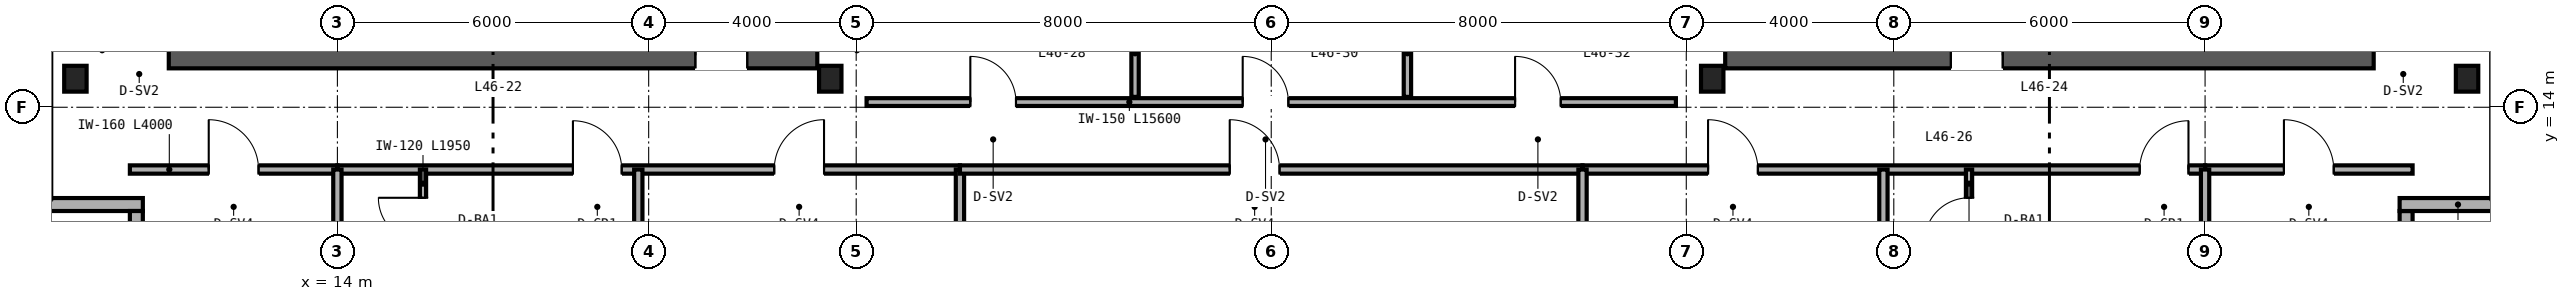
"""IFC4 building model, lengths in metres.
Left out: names, types, materials, properties, quantities, classifications, styles, units other than length and angle.
Written with IfcOpenShell. Run it as: python <this file> out.ifc"""

import sys

from ifc_helpers import new_model, si_unit, direction, frame, frame_2d, origin, origin_2d, place, context, subcontext, project, spatial, rectangle, i_section, extrude, source, transform, mapped, element, fill, save


model = new_model("IFC4")
c1 = context("Model", 3, precision=1e-05, world=origin(), true_north=direction((0.0, 1.0)))
c2 = subcontext(c1, "Body", "Model", "MODEL_VIEW")
j1 = project(units=[si_unit("LENGTHUNIT", "METRE"), si_unit("PLANEANGLEUNIT", "RADIAN")], contexts=[c1])
p1 = place(None, origin())
s1 = spatial("IfcSite", under=j1, at=p1, CompositionType="ELEMENT")
p2 = place(p1, origin())
s2 = spatial("IfcBuilding", under=s1, at=p2, CompositionType="ELEMENT")
p3 = place(p2, frame((0.0, 0.0, 184.8)))
s3 = spatial("IfcBuildingStorey", under=s2, at=p3, CompositionType="ELEMENT", Elevation=184.8)
p4 = place(p3, frame((10.75, 15.0, 0.0), z_axis=(0.0, 0.0, 1.0), x_axis=(1.0, 0.0, 0.0)))
e1 = element("IfcWall", 1, at=p4, inside=s3, PredefinedType="SHEAR", context=c2, shape_type="SweptSolid", body=[
    extrude(rectangle(XDim=12.5, YDim=0.5, at=frame_2d((6.25, 0.0))), origin(), (0.0, 0.0, 1.0), 3.37),
])
p5 = place(p4, frame((10.15, 0.0, 0.0)))
e2 = element("IfcOpeningElement", 2, at=p5, cuts=e1, PredefinedType="OPENING", context=c2, shape_type="SweptSolid", body=[
    extrude(rectangle(XDim=1.0, YDim=2.15, at=frame_2d((0.5, 1.075))), frame((0.0, 0.26, 0.0), z_axis=(0.0, -1.0, 0.0), x_axis=(1.0, 0.0, 0.0)), (0.0, 0.0, 1.0), 0.52),
])
p6 = place(p3, frame((40.75, 15.0, 0.0), z_axis=(0.0, 0.0, 1.0), x_axis=(1.0, 0.0, 0.0)))
e3 = element("IfcWall", 3, at=p6, inside=s3, PredefinedType="SHEAR", context=c2, shape_type="SweptSolid", body=[
    extrude(rectangle(XDim=12.5, YDim=0.5, at=frame_2d((6.25, 0.0))), origin(), (0.0, 0.0, 1.0), 3.37),
])
p7 = place(p6, frame((4.35, 0.0, 0.0)))
e4 = element("IfcOpeningElement", 4, at=p7, cuts=e3, PredefinedType="OPENING", context=c2, shape_type="SweptSolid", body=[
    extrude(rectangle(XDim=1.0, YDim=2.15, at=frame_2d((0.5, 1.075))), frame((0.0, 0.26, 0.0), z_axis=(0.0, -1.0, 0.0), x_axis=(1.0, 0.0, 0.0)), (0.0, 0.0, 1.0), 0.52),
])
m1 = source(origin(), c2, "Body", "SweptSolid", [
    extrude(i_section(OverallWidth=0.432, OverallDepth=0.498, WebThickness=0.056, FlangeThickness=0.089, FilletRadius=0.025, at=origin_2d()), origin(), (0.0, 0.0, 1.0), 3.37),
])
for number, where, z_axis, x_axis in (
    (5, (8.95, 14.55, 0.0), (0.0, 0.0, 1.0), (1.0, 0.0, 0.0)),
    (6, (23.5, 14.55, 0.0), (0.0, 0.0, 1.0), (1.0, 0.0, 0.0)),
    (7, (40.5, 14.55, 0.0), (0.0, 0.0, 1.0), (1.0, 0.0, 0.0)),
    (8, (55.05, 14.55, 0.0), (0.0, 0.0, 1.0), (1.0, 0.0, 0.0)),
):
    element("IfcColumn", number, at=place(p3, frame(where, z_axis=z_axis, x_axis=x_axis)), inside=s3, PredefinedType="COLUMN", context=c2, shape_type="MappedRepresentation", body=[
        mapped(m1, transform((0.0, 0.0, 0.0), scale=1.0)),
    ])
p8 = place(p3, frame((53.875, 10.0, 0.0), z_axis=(0.0, 0.0, 1.0), x_axis=(0.0, 1.0, 0.0)))
e9 = element("IfcWall", 9, at=p8, inside=s3, PredefinedType="SOLIDWALL", context=c2, shape_type="SweptSolid", body=[
    extrude(rectangle(XDim=2.0, YDim=0.25, at=frame_2d((1.0, 0.0))), origin(), (0.0, 0.0, 1.0), 3.37),
])
for number, where, z_axis, x_axis in (
    (10, (53.75, 12.125, 0.0), (0.0, 0.0, 1.0), (1.0, 0.0, 0.0)),
    (11, (8.0, 12.125, 0.0), (0.0, 0.0, 1.0), (1.0, 0.0, 0.0)),
):
    element("IfcWall", number, at=place(p3, frame(where, z_axis=z_axis, x_axis=x_axis)), inside=s3, PredefinedType="SOLIDWALL", context=c2, shape_type="SweptSolid", body=[
        extrude(rectangle(XDim=2.25, YDim=0.25, at=frame_2d((1.125, 0.0))), origin(), (0.0, 0.0, 1.0), 3.37),
    ])
p9 = place(p3, frame((10.125, 12.0, 0.0), z_axis=(0.0, 0.0, 1.0), x_axis=(0.0, -1.0, 0.0)))
e12 = element("IfcWall", 12, at=p9, inside=s3, PredefinedType="SOLIDWALL", context=c2, shape_type="SweptSolid", body=[
    extrude(rectangle(XDim=2.0, YDim=0.25, at=frame_2d((1.0, 0.0))), origin(), (0.0, 0.0, 1.0), 3.37),
])
p10 = place(p3, frame((24.2, 14.1, 0.0), z_axis=(0.0, 0.0, 1.0), x_axis=(1.0, 0.0, 0.0)))
e13 = element("IfcWall", 13, at=p10, inside=s3, PredefinedType="PARTITIONING", context=c2, shape_type="SweptSolid", body=[
    extrude(rectangle(XDim=15.6, YDim=0.15, at=frame_2d((7.8, 0.0))), origin(), (0.0, 0.0, 1.0), 3.37),
])
p11 = place(p10, frame((2.0, 0.0, 0.0)))
e14 = element("IfcOpeningElement", 14, at=p11, cuts=e13, PredefinedType="OPENING", context=c2, shape_type="SweptSolid", body=[
    extrude(rectangle(XDim=0.88, YDim=2.15, at=frame_2d((0.44, 1.075))), frame((0.0, 0.085, 0.0), z_axis=(0.0, -1.0, 0.0), x_axis=(1.0, 0.0, 0.0)), (0.0, 0.0, 1.0), 0.17),
])
p12 = place(p10, frame((7.25, 0.0, 0.0)))
e15 = element("IfcOpeningElement", 15, at=p12, cuts=e13, PredefinedType="OPENING", context=c2, shape_type="SweptSolid", body=[
    extrude(rectangle(XDim=0.88, YDim=2.15, at=frame_2d((0.44, 1.075))), frame((0.0, 0.085, 0.0), z_axis=(0.0, -1.0, 0.0), x_axis=(1.0, 0.0, 0.0)), (0.0, 0.0, 1.0), 0.17),
])
p13 = place(p10, frame((12.5, 0.0, 0.0)))
e16 = element("IfcOpeningElement", 16, at=p13, cuts=e13, PredefinedType="OPENING", context=c2, shape_type="SweptSolid", body=[
    extrude(rectangle(XDim=0.88, YDim=2.15, at=frame_2d((0.44, 1.075))), frame((0.0, 0.085, 0.0), z_axis=(0.0, -1.0, 0.0), x_axis=(1.0, 0.0, 0.0)), (0.0, 0.0, 1.0), 0.17),
])
for number, where, z_axis, x_axis in (
    (17, (29.375, 14.2, 0.0), (0.0, 0.0, 1.0), (0.0, 1.0, 0.0)),
    (18, (34.625, 14.2, 0.0), (0.0, 0.0, 1.0), (0.0, 1.0, 0.0)),
):
    element("IfcWall", number, at=place(p3, frame(where, z_axis=z_axis, x_axis=x_axis)), inside=s3, PredefinedType="PARTITIONING", context=c2, shape_type="SweptSolid", body=[
        extrude(rectangle(XDim=1.68, YDim=0.142, at=frame_2d((0.84, 0.0))), origin(), (0.0, 0.0, 1.0), 3.37),
    ])
p14 = place(p3, frame((10.0, 12.8, 0.0), z_axis=(0.0, 0.0, 1.0), x_axis=(1.0, 0.0, 0.0)))
e19 = element("IfcWall", 19, at=p14, inside=s3, PredefinedType="PARTITIONING", context=c2, shape_type="SweptSolid", body=[
    extrude(rectangle(XDim=4.0, YDim=0.16, at=frame_2d((2.0, 0.0))), origin(), (0.0, 0.0, 1.0), 3.37),
])
p15 = place(p14, frame((1.52, 0.0, 0.0)))
e20 = element("IfcOpeningElement", 20, at=p15, cuts=e19, PredefinedType="OPENING", context=c2, shape_type="SweptSolid", body=[
    extrude(rectangle(XDim=0.96, YDim=2.15, at=frame_2d((0.48, 1.075))), frame((0.0, 0.09, 0.0), z_axis=(0.0, -1.0, 0.0), x_axis=(1.0, 0.0, 0.0)), (0.0, 0.0, 1.0), 0.18),
])
p16 = place(p3, frame((50.0, 12.8, 0.0), z_axis=(0.0, 0.0, 1.0), x_axis=(1.0, 0.0, 0.0)))
e21 = element("IfcWall", 21, at=p16, inside=s3, PredefinedType="PARTITIONING", context=c2, shape_type="SweptSolid", body=[
    extrude(rectangle(XDim=4.0, YDim=0.16, at=frame_2d((2.0, 0.0))), origin(), (0.0, 0.0, 1.0), 3.37),
])
p17 = place(p16, frame((1.52, 0.0, 0.0)))
e22 = element("IfcOpeningElement", 22, at=p17, cuts=e21, PredefinedType="OPENING", context=c2, shape_type="SweptSolid", body=[
    extrude(rectangle(XDim=0.96, YDim=2.15, at=frame_2d((0.48, 1.075))), frame((0.0, 0.09, 0.0), z_axis=(0.0, -1.0, 0.0), x_axis=(1.0, 0.0, 0.0)), (0.0, 0.0, 1.0), 0.18),
])
p18 = place(p3, frame((14.0, 12.8, 0.0), z_axis=(0.0, 0.0, 1.0), x_axis=(1.0, 0.0, 0.0)))
e23 = element("IfcWall", 23, at=p18, inside=s3, PredefinedType="PARTITIONING", context=c2, shape_type="SweptSolid", body=[
    extrude(rectangle(XDim=12.0, YDim=0.16, at=frame_2d((6.0, 0.0))), origin(), (0.0, 0.0, 1.0), 2.913),
])
p19 = place(p18, frame((4.54, 0.0, 0.0)))
e24 = element("IfcOpeningElement", 24, at=p19, cuts=e23, PredefinedType="OPENING", context=c2, shape_type="SweptSolid", body=[
    extrude(rectangle(XDim=0.94, YDim=2.15, at=frame_2d((0.47, 1.075))), frame((0.0, 0.09, 0.0), z_axis=(0.0, -1.0, 0.0), x_axis=(1.0, 0.0, 0.0)), (0.0, 0.0, 1.0), 0.18),
])
p20 = place(p18, frame((8.42, 0.0, 0.0)))
e25 = element("IfcOpeningElement", 25, at=p20, cuts=e23, PredefinedType="OPENING", context=c2, shape_type="SweptSolid", body=[
    extrude(rectangle(XDim=0.96, YDim=2.15, at=frame_2d((0.48, 1.075))), frame((0.0, 0.09, 0.0), z_axis=(0.0, -1.0, 0.0), x_axis=(1.0, 0.0, 0.0)), (0.0, 0.0, 1.0), 0.18),
])
p21 = place(p3, frame((14.0, 6.36, 0.0), z_axis=(0.0, 0.0, 1.0), x_axis=(0.0, 1.0, 0.0)))
e26 = element("IfcWall", 26, at=p21, inside=s3, PredefinedType="PARTITIONING", context=c2, shape_type="SweptSolid", body=[
    extrude(rectangle(XDim=6.44, YDim=0.16, at=frame_2d((3.22, 0.0))), origin(), (0.0, 0.0, 1.0), 2.677),
])
p22 = place(p3, frame((26.0, 6.36, 0.0), z_axis=(0.0, 0.0, 1.0), x_axis=(0.0, 1.0, 0.0)))
e27 = element("IfcWall", 27, at=p22, inside=s3, PredefinedType="PARTITIONING", context=c2, shape_type="SweptSolid", body=[
    extrude(rectangle(XDim=6.44, YDim=0.16, at=frame_2d((3.22, 0.0))), origin(), (0.0, 0.0, 1.0), 2.443),
])
p23 = place(p3, frame((19.8, 6.36, 0.0), z_axis=(0.0, 0.0, 1.0), x_axis=(0.0, 1.0, 0.0)))
e28 = element("IfcWall", 28, at=p23, inside=s3, PredefinedType="PARTITIONING", context=c2, shape_type="SweptSolid", body=[
    extrude(rectangle(XDim=6.44, YDim=0.16, at=frame_2d((3.22, 0.0))), origin(), (0.0, 0.0, 1.0), 2.677),
])
p24 = place(p3, frame((15.65, 10.85, 0.0), z_axis=(0.0, 0.0, 1.0), x_axis=(0.0, 1.0, 0.0)))
e29 = element("IfcWall", 29, at=p24, inside=s3, PredefinedType="PARTITIONING", context=c2, shape_type="SweptSolid", body=[
    extrude(rectangle(XDim=1.95, YDim=0.12, at=frame_2d((0.975, 0.0))), origin(), (0.0, 0.0, 1.0), 3.37),
])
p25 = place(p24, frame((0.545, 0.0, 0.0)))
e30 = element("IfcOpeningElement", 30, at=p25, cuts=e29, PredefinedType="OPENING", context=c2, shape_type="SweptSolid", body=[
    extrude(rectangle(XDim=0.86, YDim=2.1, at=frame_2d((0.43, 1.05))), frame((0.0, 0.07, 0.0), z_axis=(0.0, -1.0, 0.0), x_axis=(1.0, 0.0, 0.0)), (0.0, 0.0, 1.0), 0.14),
])
p26 = place(p3, frame((26.0, 12.8, 0.0), z_axis=(0.0, 0.0, 1.0), x_axis=(1.0, 0.0, 0.0)))
e31 = element("IfcWall", 31, at=p26, inside=s3, PredefinedType="PARTITIONING", context=c2, shape_type="SweptSolid", body=[
    extrude(rectangle(XDim=12.0, YDim=0.16, at=frame_2d((6.0, 0.0))), origin(), (0.0, 0.0, 1.0), 3.37),
])
p27 = place(p26, frame((5.2, 0.0, 0.0)))
e32 = element("IfcOpeningElement", 32, at=p27, cuts=e31, PredefinedType="OPENING", context=c2, shape_type="SweptSolid", body=[
    extrude(rectangle(XDim=0.96, YDim=2.15, at=frame_2d((0.48, 1.075))), frame((0.0, 0.09, 0.0), z_axis=(0.0, -1.0, 0.0), x_axis=(1.0, 0.0, 0.0)), (0.0, 0.0, 1.0), 0.18),
])
p28 = place(p3, frame((38.0, 12.8, 0.0), z_axis=(0.0, 0.0, 1.0), x_axis=(1.0, 0.0, 0.0)))
e33 = element("IfcWall", 33, at=p28, inside=s3, PredefinedType="PARTITIONING", context=c2, shape_type="SweptSolid", body=[
    extrude(rectangle(XDim=12.0, YDim=0.16, at=frame_2d((6.0, 0.0))), origin(), (0.0, 0.0, 1.0), 2.913),
])
p29 = place(p28, frame((2.42, 0.0, 0.0)))
e34 = element("IfcOpeningElement", 34, at=p29, cuts=e33, PredefinedType="OPENING", context=c2, shape_type="SweptSolid", body=[
    extrude(rectangle(XDim=0.96, YDim=2.15, at=frame_2d((0.48, 1.075))), frame((0.0, 0.09, 0.0), z_axis=(0.0, -1.0, 0.0), x_axis=(1.0, 0.0, 0.0)), (0.0, 0.0, 1.0), 0.18),
])
p30 = place(p28, frame((10.74, 0.0, 0.0)))
e35 = element("IfcOpeningElement", 35, at=p30, cuts=e33, PredefinedType="OPENING", context=c2, shape_type="SweptSolid", body=[
    extrude(rectangle(XDim=0.94, YDim=2.15, at=frame_2d((0.47, 1.075))), frame((0.0, 0.09, 0.0), z_axis=(0.0, -1.0, 0.0), x_axis=(1.0, 0.0, 0.0)), (0.0, 0.0, 1.0), 0.18),
])
p31 = place(p3, frame((38.0, 6.36, 0.0), z_axis=(0.0, 0.0, 1.0), x_axis=(0.0, 1.0, 0.0)))
e36 = element("IfcWall", 36, at=p31, inside=s3, PredefinedType="PARTITIONING", context=c2, shape_type="SweptSolid", body=[
    extrude(rectangle(XDim=6.44, YDim=0.16, at=frame_2d((3.22, 0.0))), origin(), (0.0, 0.0, 1.0), 2.443),
])
for number, where, z_axis, x_axis in (
    (37, (50.0, 6.36, 0.0), (0.0, 0.0, 1.0), (0.0, 1.0, 0.0)),
    (38, (43.8, 6.36, 0.0), (0.0, 0.0, 1.0), (0.0, 1.0, 0.0)),
):
    element("IfcWall", number, at=place(p3, frame(where, z_axis=z_axis, x_axis=x_axis)), inside=s3, PredefinedType="PARTITIONING", context=c2, shape_type="SweptSolid", body=[
        extrude(rectangle(XDim=6.44, YDim=0.16, at=frame_2d((3.22, 0.0))), origin(), (0.0, 0.0, 1.0), 2.677),
    ])
p32 = place(p3, frame((45.45, 10.85, 0.0), z_axis=(0.0, 0.0, 1.0), x_axis=(0.0, 1.0, 0.0)))
e39 = element("IfcWall", 39, at=p32, inside=s3, PredefinedType="PARTITIONING", context=c2, shape_type="SweptSolid", body=[
    extrude(rectangle(XDim=1.95, YDim=0.12, at=frame_2d((0.975, 0.0))), origin(), (0.0, 0.0, 1.0), 3.37),
])
p33 = place(p32, frame((0.545, 0.0, 0.0)))
e40 = element("IfcOpeningElement", 40, at=p33, cuts=e39, PredefinedType="OPENING", context=c2, shape_type="SweptSolid", body=[
    extrude(rectangle(XDim=0.86, YDim=2.1, at=frame_2d((0.43, 1.05))), frame((0.0, 0.07, 0.0), z_axis=(0.0, -1.0, 0.0), x_axis=(1.0, 0.0, 0.0)), (0.0, 0.0, 1.0), 0.14),
])
m2 = source(origin(), c2, "Body", "SweptSolid", [
    extrude(rectangle(XDim=1.0, YDim=2.15, at=frame_2d((0.5, 1.075))), frame((0.0, 0.025, 0.0), z_axis=(0.0, -1.0, 0.0), x_axis=(1.0, 0.0, 0.0)), (0.0, 0.0, 1.0), 0.05),
])
p34 = place(p5, origin())
e41 = element("IfcDoor", 41, at=p34, inside=s3, OperationType="SINGLE_SWING_LEFT", PredefinedType="DOOR", context=c2, shape_type="MappedRepresentation", body=[
    mapped(m2, transform((0.0, 0.0, 0.0), scale=1.0)),
])
fill(e2, e41)
p35 = place(p7, origin())
e42 = element("IfcDoor", 42, at=p35, inside=s3, OperationType="SINGLE_SWING_RIGHT", PredefinedType="DOOR", context=c2, shape_type="MappedRepresentation", body=[
    mapped(m2, transform((0.0, 0.0, 0.0), scale=1.0)),
])
fill(e4, e42)
m3 = source(origin(), c2, "Body", "SweptSolid", [
    extrude(rectangle(XDim=0.88, YDim=2.15, at=frame_2d((0.44, 1.075))), frame((0.0, 0.025, 0.0), z_axis=(0.0, -1.0, 0.0), x_axis=(1.0, 0.0, 0.0)), (0.0, 0.0, 1.0), 0.05),
])
p36 = place(p11, origin())
e43 = element("IfcDoor", 43, at=p36, inside=s3, OperationType="SINGLE_SWING_LEFT", PredefinedType="DOOR", context=c2, shape_type="MappedRepresentation", body=[
    mapped(m3, transform((0.0, 0.0, 0.0), scale=1.0)),
])
fill(e14, e43)
p37 = place(p12, origin())
e44 = element("IfcDoor", 44, at=p37, inside=s3, OperationType="SINGLE_SWING_LEFT", PredefinedType="DOOR", context=c2, shape_type="MappedRepresentation", body=[
    mapped(m3, transform((0.0, 0.0, 0.0), scale=1.0)),
])
fill(e15, e44)
p38 = place(p13, origin())
e45 = element("IfcDoor", 45, at=p38, inside=s3, OperationType="SINGLE_SWING_LEFT", PredefinedType="DOOR", context=c2, shape_type="MappedRepresentation", body=[
    mapped(m3, transform((0.0, 0.0, 0.0), scale=1.0)),
])
fill(e16, e45)
m4 = source(origin(), c2, "Body", "SweptSolid", [
    extrude(rectangle(XDim=0.96, YDim=2.15, at=frame_2d((0.48, 1.075))), frame((0.0, 0.025, 0.0), z_axis=(0.0, -1.0, 0.0), x_axis=(1.0, 0.0, 0.0)), (0.0, 0.0, 1.0), 0.05),
])
p39 = place(p15, origin())
e46 = element("IfcDoor", 46, at=p39, inside=s3, OperationType="SINGLE_SWING_LEFT", PredefinedType="DOOR", context=c2, shape_type="MappedRepresentation", body=[
    mapped(m4, transform((0.0, 0.0, 0.0), scale=1.0)),
])
fill(e20, e46)
p40 = place(p17, origin())
e47 = element("IfcDoor", 47, at=p40, inside=s3, OperationType="SINGLE_SWING_LEFT", PredefinedType="DOOR", context=c2, shape_type="MappedRepresentation", body=[
    mapped(m4, transform((0.0, 0.0, 0.0), scale=1.0)),
])
fill(e22, e47)
m5 = source(origin(), c2, "Body", "SweptSolid", [
    extrude(rectangle(XDim=0.86, YDim=2.1, at=frame_2d((0.43, 1.05))), frame((0.0, 0.025, 0.0), z_axis=(0.0, -1.0, 0.0), x_axis=(1.0, 0.0, 0.0)), (0.0, 0.0, 1.0), 0.05),
])
p41 = place(p25, origin())
e48 = element("IfcDoor", 48, at=p41, inside=s3, OperationType="SINGLE_SWING_RIGHT", PredefinedType="DOOR", context=c2, shape_type="MappedRepresentation", body=[
    mapped(m5, transform((0.0, 0.0, 0.0), scale=1.0)),
])
fill(e30, e48)
m6 = source(origin(), c2, "Body", "SweptSolid", [
    extrude(rectangle(XDim=0.94, YDim=2.15, at=frame_2d((0.47, 1.075))), frame((0.0, 0.025, 0.0), z_axis=(0.0, -1.0, 0.0), x_axis=(1.0, 0.0, 0.0)), (0.0, 0.0, 1.0), 0.05),
])
p42 = place(p19, origin())
e49 = element("IfcDoor", 49, at=p42, inside=s3, OperationType="SINGLE_SWING_LEFT", PredefinedType="DOOR", context=c2, shape_type="MappedRepresentation", body=[
    mapped(m6, transform((0.0, 0.0, 0.0), scale=1.0)),
])
fill(e24, e49)
p43 = place(p20, origin())
e50 = element("IfcDoor", 50, at=p43, inside=s3, OperationType="SINGLE_SWING_RIGHT", PredefinedType="DOOR", context=c2, shape_type="MappedRepresentation", body=[
    mapped(m4, transform((0.0, 0.0, 0.0), scale=1.0)),
])
fill(e25, e50)
p44 = place(p27, origin())
e51 = element("IfcDoor", 51, at=p44, inside=s3, OperationType="SINGLE_SWING_LEFT", PredefinedType="DOOR", context=c2, shape_type="MappedRepresentation", body=[
    mapped(m4, transform((0.0, 0.0, 0.0), scale=1.0)),
])
fill(e32, e51)
p45 = place(p33, origin())
e52 = element("IfcDoor", 52, at=p45, inside=s3, OperationType="SINGLE_SWING_LEFT", PredefinedType="DOOR", context=c2, shape_type="MappedRepresentation", body=[
    mapped(m5, transform((0.0, 0.0, 0.0), scale=1.0)),
])
fill(e40, e52)
p46 = place(p29, origin())
e53 = element("IfcDoor", 53, at=p46, inside=s3, OperationType="SINGLE_SWING_LEFT", PredefinedType="DOOR", context=c2, shape_type="MappedRepresentation", body=[
    mapped(m4, transform((0.0, 0.0, 0.0), scale=1.0)),
])
fill(e34, e53)
p47 = place(p30, origin())
e54 = element("IfcDoor", 54, at=p47, inside=s3, OperationType="SINGLE_SWING_RIGHT", PredefinedType="DOOR", context=c2, shape_type="MappedRepresentation", body=[
    mapped(m6, transform((0.0, 0.0, 0.0), scale=1.0)),
])
fill(e35, e54)
save(model, sys.argv[1])
